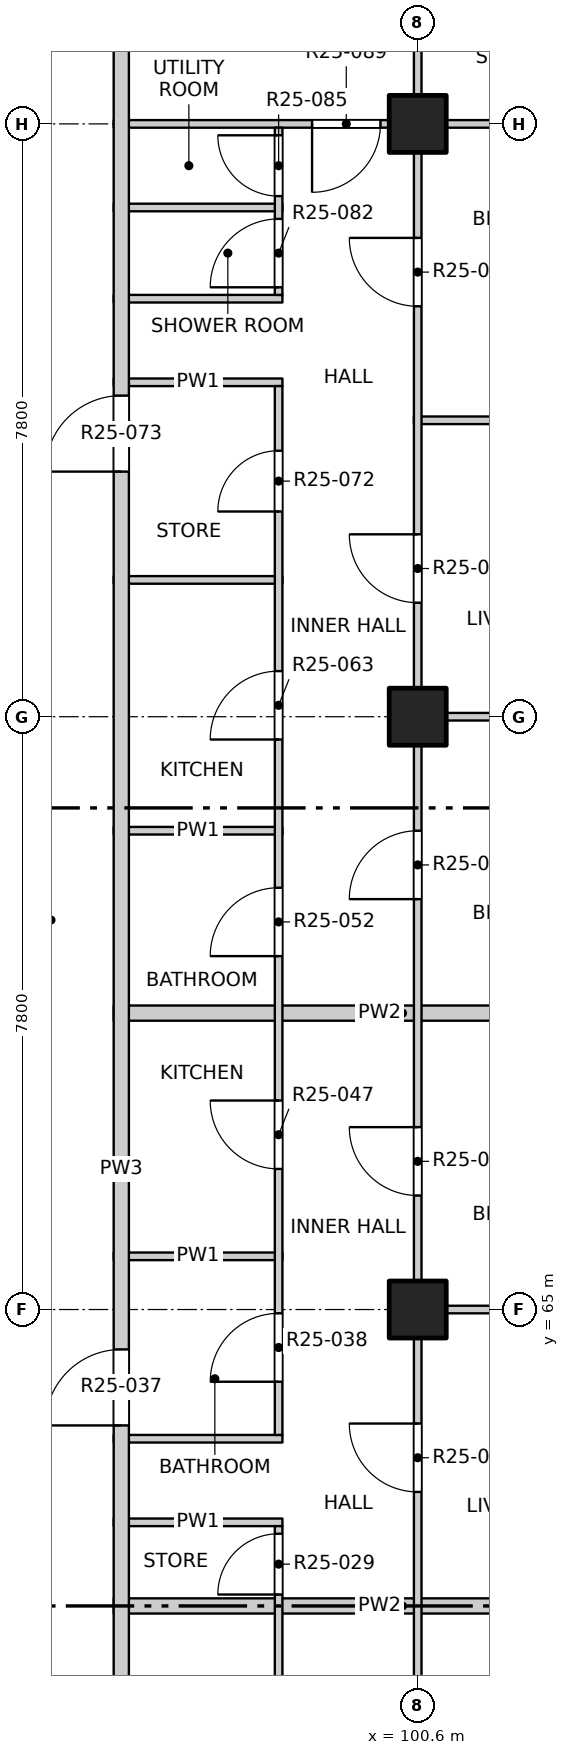
"""IFC4 building model, lengths in metres.
Left out: names, types, materials, properties, quantities, classifications, styles, units other than length and angle.
Written with IfcOpenShell. Run it as: python <this file> out.ifc"""

import sys

from ifc_helpers import new_model, si_unit, direction, frame, frame_2d, origin, origin_2d, place, context, subcontext, project, spatial, rectangle, extrude, element, fill, save


model = new_model("IFC4")
c1 = context("Model", 3, precision=1e-05, world=origin(), true_north=direction((0.0, 1.0)))
c2 = subcontext(c1, "Body", "Model", "MODEL_VIEW")
j1 = project(units=[si_unit("LENGTHUNIT", "METRE"), si_unit("PLANEANGLEUNIT", "RADIAN")], contexts=[c1])
p1 = place(None, origin())
s1 = spatial("IfcSite", under=j1, at=p1, CompositionType="ELEMENT")
p2 = place(p1, origin())
s2 = spatial("IfcBuilding", under=s1, at=p2, CompositionType="ELEMENT")
p3 = place(p2, frame((0.0, 0.0, 252.8)))
s3 = spatial("IfcBuildingStorey", under=s2, at=p3, CompositionType="ELEMENT", Elevation=252.8)
for number, where, z_axis, x_axis in (
    (1, (100.6, 65.0, -0.25), (0.0, 0.0, 1.0), (1.0, 0.0, 0.0)),
    (2, (100.6, 72.8, -0.25), (0.0, 0.0, 1.0), (1.0, 0.0, 0.0)),
    (3, (100.6, 80.6, -0.25), (0.0, 0.0, 1.0), (1.0, 0.0, 0.0)),
):
    element("IfcColumn", number, at=place(p3, frame(where, z_axis=z_axis, x_axis=x_axis)), inside=s3, PredefinedType="COLUMN", context=c2, shape_type="SweptSolid", body=[
        extrude(rectangle(XDim=0.75, YDim=0.75, at=origin_2d()), origin(), (0.0, 0.0, 1.0), 3.4),
    ])
p4 = place(p3, frame((96.6, 61.1, 0.0), z_axis=(0.0, 0.0, 1.0), x_axis=(1.0, 0.0, 0.0)))
e4 = element("IfcWall", 4, at=p4, inside=s3, PredefinedType="PARTITIONING", context=c2, shape_type="SweptSolid", body=[
    extrude(rectangle(XDim=7.6, YDim=0.2, at=frame_2d((3.8, 0.0))), origin(), (0.0, 0.0, 1.0), 2.55),
])
for number, where, z_axis, x_axis in (
    (5, (96.6, 62.2, 0.0), (0.0, 0.0, 1.0), (1.0, 0.0, 0.0)),
    (6, (96.6, 63.3, 0.0), (0.0, 0.0, 1.0), (1.0, 0.0, 0.0)),
):
    element("IfcWall", number, at=place(p3, frame(where, z_axis=z_axis, x_axis=x_axis)), inside=s3, PredefinedType="PARTITIONING", context=c2, shape_type="SweptSolid", body=[
        extrude(rectangle(XDim=2.22, YDim=0.1, at=frame_2d((1.11, 0.0))), origin(), (0.0, 0.0, 1.0), 3.15),
    ])
p5 = place(p3, frame((100.55, 65.0, 0.0), z_axis=(0.0, 0.0, 1.0), x_axis=(1.0, 0.0, 0.0)))
e7 = element("IfcWall", 7, at=p5, inside=s3, PredefinedType="PARTITIONING", context=c2, shape_type="SweptSolid", body=[
    extrude(rectangle(XDim=3.65, YDim=0.1, at=frame_2d((1.825, 0.0))), origin(), (0.0, 0.0, 1.0), 3.15),
])
p6 = place(p3, frame((96.6, 65.7, 0.0), z_axis=(0.0, 0.0, 1.0), x_axis=(1.0, 0.0, 0.0)))
e8 = element("IfcWall", 8, at=p6, inside=s3, PredefinedType="PARTITIONING", context=c2, shape_type="SweptSolid", body=[
    extrude(rectangle(XDim=2.22, YDim=0.1, at=frame_2d((1.11, 0.0))), origin(), (0.0, 0.0, 1.0), 3.15),
])
p7 = place(p3, frame((96.6, 68.9, 0.0), z_axis=(0.0, 0.0, 1.0), x_axis=(1.0, 0.0, 0.0)))
e9 = element("IfcWall", 9, at=p7, inside=s3, PredefinedType="PARTITIONING", context=c2, shape_type="SweptSolid", body=[
    extrude(rectangle(XDim=7.6, YDim=0.2, at=frame_2d((3.8, 0.0))), origin(), (0.0, 0.0, 1.0), 2.55),
])
p8 = place(p3, frame((96.6, 71.3, 0.0), z_axis=(0.0, 0.0, 1.0), x_axis=(1.0, 0.0, 0.0)))
e10 = element("IfcWall", 10, at=p8, inside=s3, PredefinedType="PARTITIONING", context=c2, shape_type="SweptSolid", body=[
    extrude(rectangle(XDim=2.22, YDim=0.1, at=frame_2d((1.11, 0.0))), origin(), (0.0, 0.0, 1.0), 3.15),
])
p9 = place(p3, frame((100.55, 72.8, 0.0), z_axis=(0.0, 0.0, 1.0), x_axis=(1.0, 0.0, 0.0)))
e11 = element("IfcWall", 11, at=p9, inside=s3, PredefinedType="PARTITIONING", context=c2, shape_type="SweptSolid", body=[
    extrude(rectangle(XDim=3.65, YDim=0.1, at=frame_2d((1.825, 0.0))), origin(), (0.0, 0.0, 1.0), 3.15),
])
p10 = place(p3, frame((96.6, 74.6, 0.0), z_axis=(0.0, 0.0, 1.0), x_axis=(1.0, 0.0, 0.0)))
e12 = element("IfcWall", 12, at=p10, inside=s3, PredefinedType="PARTITIONING", context=c2, shape_type="SweptSolid", body=[
    extrude(rectangle(XDim=2.22, YDim=0.1, at=frame_2d((1.11, 0.0))), origin(), (0.0, 0.0, 1.0), 3.15),
])
p11 = place(p3, frame((100.55, 76.7, 0.0), z_axis=(0.0, 0.0, 1.0), x_axis=(1.0, 0.0, 0.0)))
e13 = element("IfcWall", 13, at=p11, inside=s3, PredefinedType="PARTITIONING", context=c2, shape_type="SweptSolid", body=[
    extrude(rectangle(XDim=3.65, YDim=0.1, at=frame_2d((1.825, 0.0))), origin(), (0.0, 0.0, 1.0), 2.55),
])
for number, where, z_axis, x_axis in (
    (14, (96.6, 77.2, 0.0), (0.0, 0.0, 1.0), (1.0, 0.0, 0.0)),
    (15, (96.6, 78.3, 0.0), (0.0, 0.0, 1.0), (1.0, 0.0, 0.0)),
    (16, (96.6, 79.5, 0.0), (0.0, 0.0, 1.0), (1.0, 0.0, 0.0)),
):
    element("IfcWall", number, at=place(p3, frame(where, z_axis=z_axis, x_axis=x_axis)), inside=s3, PredefinedType="PARTITIONING", context=c2, shape_type="SweptSolid", body=[
        extrude(rectangle(XDim=2.22, YDim=0.1, at=frame_2d((1.11, 0.0))), origin(), (0.0, 0.0, 1.0), 3.15),
    ])
p12 = place(p3, frame((96.6, 80.6, 0.0), z_axis=(0.0, 0.0, 1.0), x_axis=(1.0, 0.0, 0.0)))
e17 = element("IfcWall", 17, at=p12, inside=s3, PredefinedType="PARTITIONING", context=c2, shape_type="SweptSolid", body=[
    extrude(rectangle(XDim=7.6, YDim=0.1, at=frame_2d((3.8, 0.0))), origin(), (0.0, 0.0, 1.0), 3.15),
])
p13 = place(p12, frame((2.61, 0.0, 0.0)))
e18 = element("IfcOpeningElement", 18, at=p13, cuts=e17, PredefinedType="OPENING", context=c2, shape_type="SweptSolid", body=[
    extrude(rectangle(XDim=0.9, YDim=2.1, at=frame_2d((0.45, 1.05))), frame((0.0, 0.06, 0.0), z_axis=(0.0, -1.0, 0.0), x_axis=(1.0, 0.0, 0.0)), (0.0, 0.0, 1.0), 0.12),
])
p14 = place(p3, frame((96.7, 49.5, 0.0), z_axis=(0.0, 0.0, 1.0), x_axis=(0.0, 1.0, 0.0)))
e19 = element("IfcWall", 19, at=p14, inside=s3, PredefinedType="PARTITIONING", context=c2, shape_type="SweptSolid", body=[
    extrude(rectangle(XDim=34.7, YDim=0.2, at=frame_2d((17.35, 0.0))), origin(), (0.0, 0.0, 1.0), 3.15),
])
p15 = place(p14, frame((6.575, 0.0, 0.0)))
e20 = element("IfcOpeningElement", 20, at=p15, cuts=e19, PredefinedType="OPENING", context=c2, shape_type="SweptSolid", body=[
    extrude(rectangle(XDim=1.0, YDim=2.1, at=frame_2d((0.5, 1.05))), frame((0.0, 0.11, 0.0), z_axis=(0.0, -1.0, 0.0), x_axis=(1.0, 0.0, 0.0)), (0.0, 0.0, 1.0), 0.22),
])
p16 = place(p14, frame((13.975, 0.0, 0.0)))
e21 = element("IfcOpeningElement", 21, at=p16, cuts=e19, PredefinedType="OPENING", context=c2, shape_type="SweptSolid", body=[
    extrude(rectangle(XDim=1.0, YDim=2.1, at=frame_2d((0.5, 1.05))), frame((0.0, 0.11, 0.0), z_axis=(0.0, -1.0, 0.0), x_axis=(1.0, 0.0, 0.0)), (0.0, 0.0, 1.0), 0.22),
])
p17 = place(p14, frame((26.525, 0.0, 0.0)))
e22 = element("IfcOpeningElement", 22, at=p17, cuts=e19, PredefinedType="OPENING", context=c2, shape_type="SweptSolid", body=[
    extrude(rectangle(XDim=1.0, YDim=2.1, at=frame_2d((0.5, 1.05))), frame((0.0, 0.11, 0.0), z_axis=(0.0, -1.0, 0.0), x_axis=(1.0, 0.0, 0.0)), (0.0, 0.0, 1.0), 0.22),
])
p18 = place(p3, frame((98.77, 55.95, 0.0), z_axis=(0.0, 0.0, 1.0), x_axis=(0.0, 1.0, 0.0)))
e23 = element("IfcWall", 23, at=p18, inside=s3, PredefinedType="PARTITIONING", context=c2, shape_type="SweptSolid", body=[
    extrude(rectangle(XDim=6.2, YDim=0.1, at=frame_2d((3.1, 0.0))), origin(), (0.0, 0.0, 1.0), 3.15),
])
p19 = place(p18, frame((0.4, 0.0, 0.0)))
e24 = element("IfcOpeningElement", 24, at=p19, cuts=e23, PredefinedType="OPENING", context=c2, shape_type="SweptSolid", body=[
    extrude(rectangle(XDim=0.9, YDim=2.1, at=frame_2d((0.45, 1.05))), frame((0.0, 0.06, 0.0), z_axis=(0.0, -1.0, 0.0), x_axis=(1.0, 0.0, 0.0)), (0.0, 0.0, 1.0), 0.12),
])
p20 = place(p18, frame((3.0, 0.0, 0.0)))
e25 = element("IfcOpeningElement", 25, at=p20, cuts=e23, PredefinedType="OPENING", context=c2, shape_type="SweptSolid", body=[
    extrude(rectangle(XDim=0.9, YDim=2.1, at=frame_2d((0.45, 1.05))), frame((0.0, 0.06, 0.0), z_axis=(0.0, -1.0, 0.0), x_axis=(1.0, 0.0, 0.0)), (0.0, 0.0, 1.0), 0.12),
])
p21 = place(p18, frame((5.3, 0.0, 0.0)))
e26 = element("IfcOpeningElement", 26, at=p21, cuts=e23, PredefinedType="OPENING", context=c2, shape_type="SweptSolid", body=[
    extrude(rectangle(XDim=0.8, YDim=2.1, at=frame_2d((0.4, 1.05))), frame((0.0, 0.06, 0.0), z_axis=(0.0, -1.0, 0.0), x_axis=(1.0, 0.0, 0.0)), (0.0, 0.0, 1.0), 0.12),
])
p22 = place(p3, frame((98.77, 63.35, 0.0), z_axis=(0.0, 0.0, 1.0), x_axis=(0.0, 1.0, 0.0)))
e27 = element("IfcWall", 27, at=p22, inside=s3, PredefinedType="PARTITIONING", context=c2, shape_type="SweptSolid", body=[
    extrude(rectangle(XDim=13.8, YDim=0.1, at=frame_2d((6.9, 0.0))), origin(), (0.0, 0.0, 1.0), 3.15),
])
p23 = place(p22, frame((0.7, 0.0, 0.0)))
e28 = element("IfcOpeningElement", 28, at=p23, cuts=e27, PredefinedType="OPENING", context=c2, shape_type="SweptSolid", body=[
    extrude(rectangle(XDim=0.9, YDim=2.1, at=frame_2d((0.45, 1.05))), frame((0.0, 0.06, 0.0), z_axis=(0.0, -1.0, 0.0), x_axis=(1.0, 0.0, 0.0)), (0.0, 0.0, 1.0), 0.12),
])
p24 = place(p22, frame((3.5, 0.0, 0.0)))
e29 = element("IfcOpeningElement", 29, at=p24, cuts=e27, PredefinedType="OPENING", context=c2, shape_type="SweptSolid", body=[
    extrude(rectangle(XDim=0.9, YDim=2.1, at=frame_2d((0.45, 1.05))), frame((0.0, 0.06, 0.0), z_axis=(0.0, -1.0, 0.0), x_axis=(1.0, 0.0, 0.0)), (0.0, 0.0, 1.0), 0.12),
])
p25 = place(p22, frame((6.3, 0.0, 0.0)))
e30 = element("IfcOpeningElement", 30, at=p25, cuts=e27, PredefinedType="OPENING", context=c2, shape_type="SweptSolid", body=[
    extrude(rectangle(XDim=0.9, YDim=2.1, at=frame_2d((0.45, 1.05))), frame((0.0, 0.06, 0.0), z_axis=(0.0, -1.0, 0.0), x_axis=(1.0, 0.0, 0.0)), (0.0, 0.0, 1.0), 0.12),
])
p26 = place(p22, frame((9.15, 0.0, 0.0)))
e31 = element("IfcOpeningElement", 31, at=p26, cuts=e27, PredefinedType="OPENING", context=c2, shape_type="SweptSolid", body=[
    extrude(rectangle(XDim=0.9, YDim=2.1, at=frame_2d((0.45, 1.05))), frame((0.0, 0.06, 0.0), z_axis=(0.0, -1.0, 0.0), x_axis=(1.0, 0.0, 0.0)), (0.0, 0.0, 1.0), 0.12),
])
p27 = place(p22, frame((12.15, 0.0, 0.0)))
e32 = element("IfcOpeningElement", 32, at=p27, cuts=e27, PredefinedType="OPENING", context=c2, shape_type="SweptSolid", body=[
    extrude(rectangle(XDim=0.8, YDim=2.1, at=frame_2d((0.4, 1.05))), frame((0.0, 0.06, 0.0), z_axis=(0.0, -1.0, 0.0), x_axis=(1.0, 0.0, 0.0)), (0.0, 0.0, 1.0), 0.12),
])
p28 = place(p3, frame((98.77, 78.35, 0.0), z_axis=(0.0, 0.0, 1.0), x_axis=(0.0, 1.0, 0.0)))
e33 = element("IfcWall", 33, at=p28, inside=s3, PredefinedType="PARTITIONING", context=c2, shape_type="SweptSolid", body=[
    extrude(rectangle(XDim=2.2, YDim=0.1, at=frame_2d((1.1, 0.0))), origin(), (0.0, 0.0, 1.0), 3.15),
])
p29 = place(p28, frame((0.1, 0.0, 0.0)))
e34 = element("IfcOpeningElement", 34, at=p29, cuts=e33, PredefinedType="OPENING", context=c2, shape_type="SweptSolid", body=[
    extrude(rectangle(XDim=0.9, YDim=2.1, at=frame_2d((0.45, 1.05))), frame((0.0, 0.06, 0.0), z_axis=(0.0, -1.0, 0.0), x_axis=(1.0, 0.0, 0.0)), (0.0, 0.0, 1.0), 0.12),
])
p30 = place(p28, frame((1.3, 0.0, 0.0)))
e35 = element("IfcOpeningElement", 35, at=p30, cuts=e33, PredefinedType="OPENING", context=c2, shape_type="SweptSolid", body=[
    extrude(rectangle(XDim=0.8, YDim=2.1, at=frame_2d((0.4, 1.05))), frame((0.0, 0.06, 0.0), z_axis=(0.0, -1.0, 0.0), x_axis=(1.0, 0.0, 0.0)), (0.0, 0.0, 1.0), 0.12),
])
p31 = place(p3, frame((100.6, 45.8, 0.0), z_axis=(0.0, 0.0, 1.0), x_axis=(0.0, 1.0, 0.0)))
e36 = element("IfcWall", 36, at=p31, inside=s3, PredefinedType="PARTITIONING", context=c2, shape_type="SweptSolid", body=[
    extrude(rectangle(XDim=38.4, YDim=0.1, at=frame_2d((19.2, 0.0))), origin(), (0.0, 0.0, 1.0), 3.15),
])
p32 = place(p31, frame((1.05, 0.0, 0.0)))
e37 = element("IfcOpeningElement", 37, at=p32, cuts=e36, PredefinedType="OPENING", context=c2, shape_type="SweptSolid", body=[
    extrude(rectangle(XDim=1.2, YDim=2.1, at=frame_2d((0.6, 1.05))), frame((0.0, 0.06, 0.0), z_axis=(0.0, -1.0, 0.0), x_axis=(1.0, 0.0, 0.0)), (0.0, 0.0, 1.0), 0.12),
])
p33 = place(p31, frame((5.1, 0.0, 0.0)))
e38 = element("IfcOpeningElement", 38, at=p33, cuts=e36, PredefinedType="OPENING", context=c2, shape_type="SweptSolid", body=[
    extrude(rectangle(XDim=0.9, YDim=2.1, at=frame_2d((0.45, 1.05))), frame((0.0, 0.06, 0.0), z_axis=(0.0, -1.0, 0.0), x_axis=(1.0, 0.0, 0.0)), (0.0, 0.0, 1.0), 0.12),
])
p34 = place(p31, frame((9.0, 0.0, 0.0)))
e39 = element("IfcOpeningElement", 39, at=p34, cuts=e36, PredefinedType="OPENING", context=c2, shape_type="SweptSolid", body=[
    extrude(rectangle(XDim=0.9, YDim=2.1, at=frame_2d((0.45, 1.05))), frame((0.0, 0.06, 0.0), z_axis=(0.0, -1.0, 0.0), x_axis=(1.0, 0.0, 0.0)), (0.0, 0.0, 1.0), 0.12),
])
p35 = place(p31, frame((12.9, 0.0, 0.0)))
e40 = element("IfcOpeningElement", 40, at=p35, cuts=e36, PredefinedType="OPENING", context=c2, shape_type="SweptSolid", body=[
    extrude(rectangle(XDim=0.9, YDim=2.1, at=frame_2d((0.45, 1.05))), frame((0.0, 0.06, 0.0), z_axis=(0.0, -1.0, 0.0), x_axis=(1.0, 0.0, 0.0)), (0.0, 0.0, 1.0), 0.12),
])
p36 = place(p31, frame((16.8, 0.0, 0.0)))
e41 = element("IfcOpeningElement", 41, at=p36, cuts=e36, PredefinedType="OPENING", context=c2, shape_type="SweptSolid", body=[
    extrude(rectangle(XDim=0.9, YDim=2.1, at=frame_2d((0.45, 1.05))), frame((0.0, 0.06, 0.0), z_axis=(0.0, -1.0, 0.0), x_axis=(1.0, 0.0, 0.0)), (0.0, 0.0, 1.0), 0.12),
])
p37 = place(p31, frame((20.7, 0.0, 0.0)))
e42 = element("IfcOpeningElement", 42, at=p37, cuts=e36, PredefinedType="OPENING", context=c2, shape_type="SweptSolid", body=[
    extrude(rectangle(XDim=0.9, YDim=2.1, at=frame_2d((0.45, 1.05))), frame((0.0, 0.06, 0.0), z_axis=(0.0, -1.0, 0.0), x_axis=(1.0, 0.0, 0.0)), (0.0, 0.0, 1.0), 0.12),
])
p38 = place(p31, frame((24.6, 0.0, 0.0)))
e43 = element("IfcOpeningElement", 43, at=p38, cuts=e36, PredefinedType="OPENING", context=c2, shape_type="SweptSolid", body=[
    extrude(rectangle(XDim=0.9, YDim=2.1, at=frame_2d((0.45, 1.05))), frame((0.0, 0.06, 0.0), z_axis=(0.0, -1.0, 0.0), x_axis=(1.0, 0.0, 0.0)), (0.0, 0.0, 1.0), 0.12),
])
p39 = place(p31, frame((28.5, 0.0, 0.0)))
e44 = element("IfcOpeningElement", 44, at=p39, cuts=e36, PredefinedType="OPENING", context=c2, shape_type="SweptSolid", body=[
    extrude(rectangle(XDim=0.9, YDim=2.1, at=frame_2d((0.45, 1.05))), frame((0.0, 0.06, 0.0), z_axis=(0.0, -1.0, 0.0), x_axis=(1.0, 0.0, 0.0)), (0.0, 0.0, 1.0), 0.12),
])
p40 = place(p31, frame((32.4, 0.0, 0.0)))
e45 = element("IfcOpeningElement", 45, at=p40, cuts=e36, PredefinedType="OPENING", context=c2, shape_type="SweptSolid", body=[
    extrude(rectangle(XDim=0.9, YDim=2.1, at=frame_2d((0.45, 1.05))), frame((0.0, 0.06, 0.0), z_axis=(0.0, -1.0, 0.0), x_axis=(1.0, 0.0, 0.0)), (0.0, 0.0, 1.0), 0.12),
])
p41 = place(p31, frame((36.15, 0.0, 0.0)))
e46 = element("IfcOpeningElement", 46, at=p41, cuts=e36, PredefinedType="OPENING", context=c2, shape_type="SweptSolid", body=[
    extrude(rectangle(XDim=1.2, YDim=2.1, at=frame_2d((0.6, 1.05))), frame((0.0, 0.06, 0.0), z_axis=(0.0, -1.0, 0.0), x_axis=(1.0, 0.0, 0.0)), (0.0, 0.0, 1.0), 0.12),
])
p42 = place(p21, origin())
e47 = element("IfcDoor", 47, at=p42, inside=s3, OperationType="SINGLE_SWING_LEFT", PredefinedType="DOOR", context=c2, shape_type="SweptSolid", body=[
    extrude(rectangle(XDim=0.8, YDim=2.1, at=frame_2d((0.4, 1.05))), frame((0.0, 0.025, 0.0), z_axis=(0.0, -1.0, 0.0), x_axis=(1.0, 0.0, 0.0)), (0.0, 0.0, 1.0), 0.05),
])
fill(e26, e47)
p43 = place(p36, origin())
e48 = element("IfcDoor", 48, at=p43, inside=s3, OperationType="SINGLE_SWING_RIGHT", PredefinedType="DOOR", context=c2, shape_type="SweptSolid", body=[
    extrude(rectangle(XDim=0.9, YDim=2.1, at=frame_2d((0.45, 1.05))), frame((0.0, 0.025, 0.0), z_axis=(0.0, -1.0, 0.0), x_axis=(1.0, 0.0, 0.0)), (0.0, 0.0, 1.0), 0.05),
])
fill(e41, e48)
p44 = place(p16, origin())
e49 = element("IfcDoor", 49, at=p44, inside=s3, OperationType="SINGLE_SWING_LEFT", PredefinedType="DOOR", context=c2, shape_type="SweptSolid", body=[
    extrude(rectangle(XDim=1.0, YDim=2.1, at=frame_2d((0.5, 1.05))), frame((0.0, 0.025, 0.0), z_axis=(0.0, -1.0, 0.0), x_axis=(1.0, 0.0, 0.0)), (0.0, 0.0, 1.0), 0.05),
])
fill(e21, e49)
p45 = place(p23, origin())
e50 = element("IfcDoor", 50, at=p45, inside=s3, OperationType="SINGLE_SWING_LEFT", PredefinedType="DOOR", context=c2, shape_type="SweptSolid", body=[
    extrude(rectangle(XDim=0.9, YDim=2.1, at=frame_2d((0.45, 1.05))), frame((0.0, 0.025, 0.0), z_axis=(0.0, -1.0, 0.0), x_axis=(1.0, 0.0, 0.0)), (0.0, 0.0, 1.0), 0.05),
])
fill(e28, e50)
p46 = place(p37, origin())
e51 = element("IfcDoor", 51, at=p46, inside=s3, OperationType="SINGLE_SWING_RIGHT", PredefinedType="DOOR", context=c2, shape_type="SweptSolid", body=[
    extrude(rectangle(XDim=0.9, YDim=2.1, at=frame_2d((0.45, 1.05))), frame((0.0, 0.025, 0.0), z_axis=(0.0, -1.0, 0.0), x_axis=(1.0, 0.0, 0.0)), (0.0, 0.0, 1.0), 0.05),
])
fill(e42, e51)
p47 = place(p24, origin())
e52 = element("IfcDoor", 52, at=p47, inside=s3, OperationType="SINGLE_SWING_RIGHT", PredefinedType="DOOR", context=c2, shape_type="SweptSolid", body=[
    extrude(rectangle(XDim=0.9, YDim=2.1, at=frame_2d((0.45, 1.05))), frame((0.0, 0.025, 0.0), z_axis=(0.0, -1.0, 0.0), x_axis=(1.0, 0.0, 0.0)), (0.0, 0.0, 1.0), 0.05),
])
fill(e29, e52)
p48 = place(p25, origin())
e53 = element("IfcDoor", 53, at=p48, inside=s3, OperationType="SINGLE_SWING_LEFT", PredefinedType="DOOR", context=c2, shape_type="SweptSolid", body=[
    extrude(rectangle(XDim=0.9, YDim=2.1, at=frame_2d((0.45, 1.05))), frame((0.0, 0.025, 0.0), z_axis=(0.0, -1.0, 0.0), x_axis=(1.0, 0.0, 0.0)), (0.0, 0.0, 1.0), 0.05),
])
fill(e30, e53)
p49 = place(p38, origin())
e54 = element("IfcDoor", 54, at=p49, inside=s3, OperationType="SINGLE_SWING_LEFT", PredefinedType="DOOR", context=c2, shape_type="SweptSolid", body=[
    extrude(rectangle(XDim=0.9, YDim=2.1, at=frame_2d((0.45, 1.05))), frame((0.0, 0.025, 0.0), z_axis=(0.0, -1.0, 0.0), x_axis=(1.0, 0.0, 0.0)), (0.0, 0.0, 1.0), 0.05),
])
fill(e43, e54)
p50 = place(p26, origin())
e55 = element("IfcDoor", 55, at=p50, inside=s3, OperationType="SINGLE_SWING_LEFT", PredefinedType="DOOR", context=c2, shape_type="SweptSolid", body=[
    extrude(rectangle(XDim=0.9, YDim=2.1, at=frame_2d((0.45, 1.05))), frame((0.0, 0.025, 0.0), z_axis=(0.0, -1.0, 0.0), x_axis=(1.0, 0.0, 0.0)), (0.0, 0.0, 1.0), 0.05),
])
fill(e31, e55)
p51 = place(p39, origin())
e56 = element("IfcDoor", 56, at=p51, inside=s3, OperationType="SINGLE_SWING_RIGHT", PredefinedType="DOOR", context=c2, shape_type="SweptSolid", body=[
    extrude(rectangle(XDim=0.9, YDim=2.1, at=frame_2d((0.45, 1.05))), frame((0.0, 0.025, 0.0), z_axis=(0.0, -1.0, 0.0), x_axis=(1.0, 0.0, 0.0)), (0.0, 0.0, 1.0), 0.05),
])
fill(e44, e56)
p52 = place(p27, origin())
e57 = element("IfcDoor", 57, at=p52, inside=s3, OperationType="SINGLE_SWING_LEFT", PredefinedType="DOOR", context=c2, shape_type="SweptSolid", body=[
    extrude(rectangle(XDim=0.8, YDim=2.1, at=frame_2d((0.4, 1.05))), frame((0.0, 0.025, 0.0), z_axis=(0.0, -1.0, 0.0), x_axis=(1.0, 0.0, 0.0)), (0.0, 0.0, 1.0), 0.05),
])
fill(e32, e57)
p53 = place(p17, origin())
e58 = element("IfcDoor", 58, at=p53, inside=s3, OperationType="SINGLE_SWING_RIGHT", PredefinedType="DOOR", context=c2, shape_type="SweptSolid", body=[
    extrude(rectangle(XDim=1.0, YDim=2.1, at=frame_2d((0.5, 1.05))), frame((0.0, 0.025, 0.0), z_axis=(0.0, -1.0, 0.0), x_axis=(1.0, 0.0, 0.0)), (0.0, 0.0, 1.0), 0.05),
])
fill(e22, e58)
p54 = place(p40, origin())
e59 = element("IfcDoor", 59, at=p54, inside=s3, OperationType="SINGLE_SWING_RIGHT", PredefinedType="DOOR", context=c2, shape_type="SweptSolid", body=[
    extrude(rectangle(XDim=0.9, YDim=2.1, at=frame_2d((0.45, 1.05))), frame((0.0, 0.025, 0.0), z_axis=(0.0, -1.0, 0.0), x_axis=(1.0, 0.0, 0.0)), (0.0, 0.0, 1.0), 0.05),
])
fill(e45, e59)
p55 = place(p29, origin())
e60 = element("IfcDoor", 60, at=p55, inside=s3, OperationType="SINGLE_SWING_LEFT", PredefinedType="DOOR", context=c2, shape_type="SweptSolid", body=[
    extrude(rectangle(XDim=0.9, YDim=2.1, at=frame_2d((0.45, 1.05))), frame((0.0, 0.025, 0.0), z_axis=(0.0, -1.0, 0.0), x_axis=(1.0, 0.0, 0.0)), (0.0, 0.0, 1.0), 0.05),
])
fill(e34, e60)
p56 = place(p30, origin())
e61 = element("IfcDoor", 61, at=p56, inside=s3, OperationType="SINGLE_SWING_RIGHT", PredefinedType="DOOR", context=c2, shape_type="SweptSolid", body=[
    extrude(rectangle(XDim=0.8, YDim=2.1, at=frame_2d((0.4, 1.05))), frame((0.0, 0.025, 0.0), z_axis=(0.0, -1.0, 0.0), x_axis=(1.0, 0.0, 0.0)), (0.0, 0.0, 1.0), 0.05),
])
fill(e35, e61)
p57 = place(p13, origin())
e62 = element("IfcDoor", 62, at=p57, inside=s3, OperationType="SINGLE_SWING_RIGHT", PredefinedType="DOOR", context=c2, shape_type="SweptSolid", body=[
    extrude(rectangle(XDim=0.9, YDim=2.1, at=frame_2d((0.45, 1.05))), frame((0.0, 0.025, 0.0), z_axis=(0.0, -1.0, 0.0), x_axis=(1.0, 0.0, 0.0)), (0.0, 0.0, 1.0), 0.05),
])
fill(e18, e62)
save(model, sys.argv[1])
